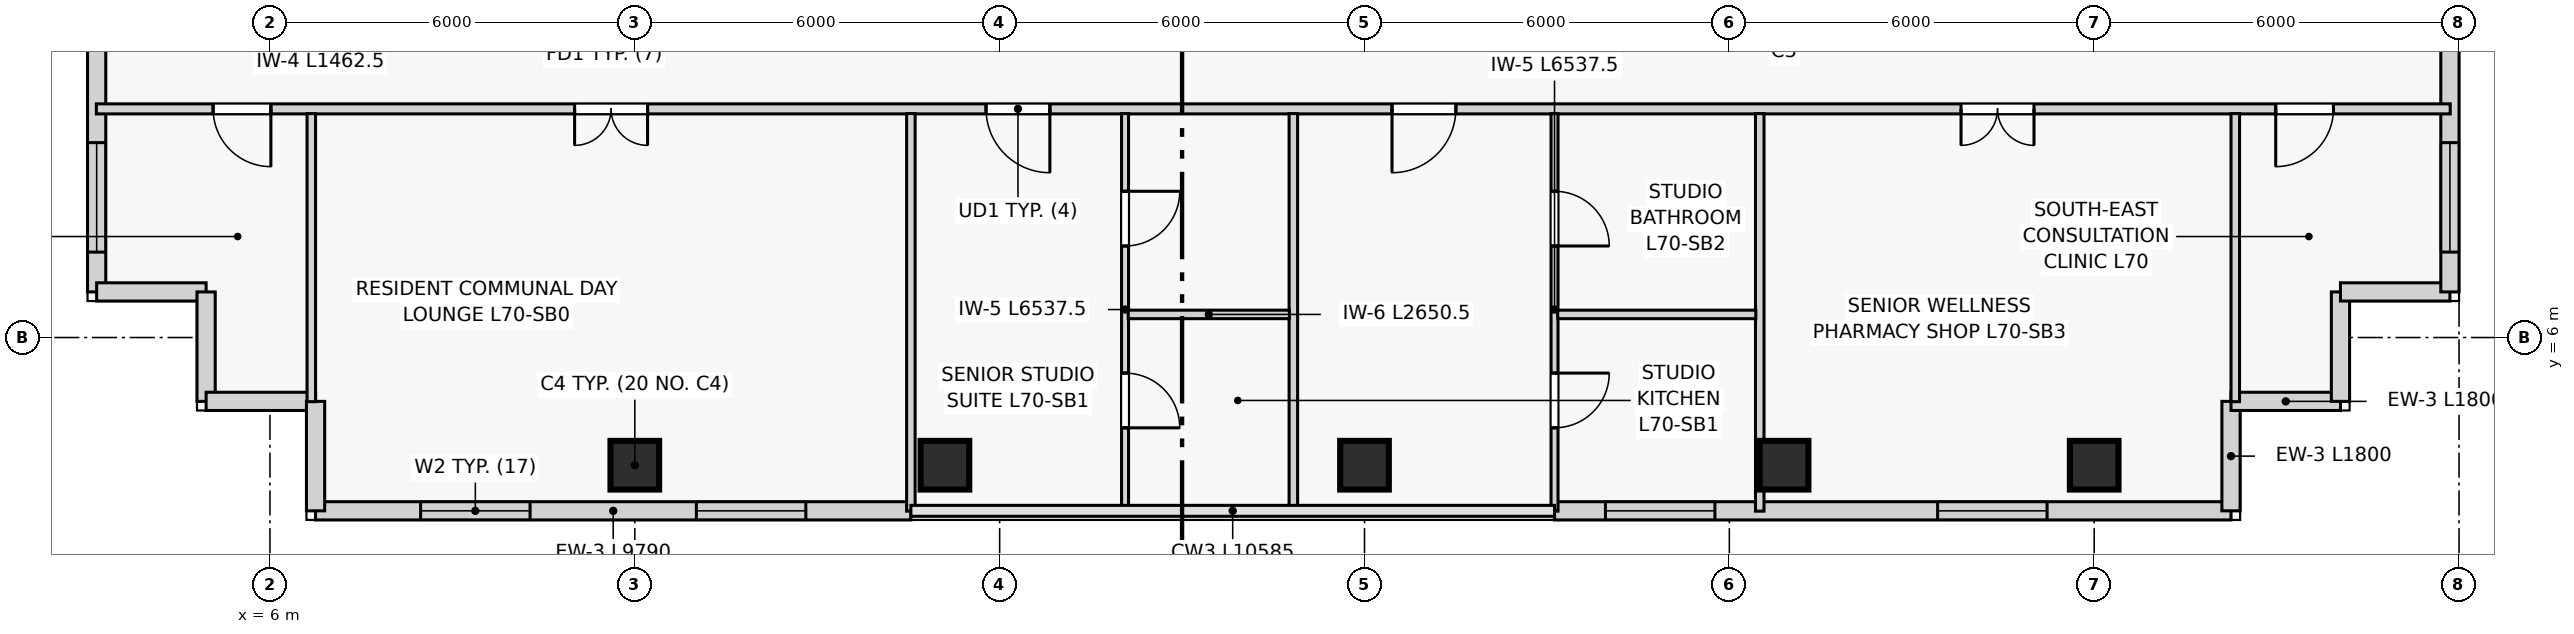
"""IFC4 building model, lengths in metres.
Left out: names, types, materials, properties, quantities, classifications, styles, units other than length and angle.
Written with IfcOpenShell. Run it as: python <this file> out.ifc"""

import sys

from ifc_helpers import new_model, si_unit, direction, frame, frame_2d, origin, origin_2d, place, context, subcontext, project, spatial, rectangle, extrude, source, transform, mapped, element, fill, save


model = new_model("IFC4")
c1 = context("Model", 3, precision=1e-05, world=origin(), true_north=direction((0.0, 1.0)))
c2 = subcontext(c1, "Body", "Model", "MODEL_VIEW")
j1 = project(units=[si_unit("LENGTHUNIT", "METRE"), si_unit("PLANEANGLEUNIT", "RADIAN")], contexts=[c1])
p1 = place(None, origin())
s1 = spatial("IfcSite", under=j1, at=p1, CompositionType="ELEMENT")
p2 = place(p1, origin())
s2 = spatial("IfcBuilding", under=s1, at=p2, CompositionType="ELEMENT")
p3 = place(p2, frame((0.0, 0.0, 267.3)))
s3 = spatial("IfcBuildingStorey", under=s2, at=p3, CompositionType="ELEMENT", Elevation=267.3)
m1 = source(origin(), c2, "Body", "SweptSolid", [
    extrude(rectangle(XDim=0.8, YDim=0.8, at=origin_2d()), origin(), (0.0, 0.0, 1.0), 3.6),
])
for number, where, z_axis, x_axis in (
    (1, (12.0, 3.9, 0.0), (0.0, 0.0, 1.0), (1.0, 0.0, 0.0)),
    (2, (17.1, 3.9, 0.0), (0.0, 0.0, 1.0), (1.0, 0.0, 0.0)),
    (3, (24.0, 3.9, 0.0), (0.0, 0.0, 1.0), (1.0, 0.0, 0.0)),
    (4, (30.9, 3.9, 0.0), (0.0, 0.0, 1.0), (1.0, 0.0, 0.0)),
    (5, (36.0, 3.9, 0.0), (0.0, 0.0, 1.0), (1.0, 0.0, 0.0)),
):
    element("IfcColumn", number, at=place(p3, frame(where, z_axis=z_axis, x_axis=x_axis)), inside=s3, PredefinedType="COLUMN", context=c2, shape_type="MappedRepresentation", body=[
        mapped(m1, transform((0.0, 0.0, 0.0), scale=1.0)),
    ])
p4 = place(p3, frame((6.75, 3.15, 0.0), z_axis=(0.0, 0.0, 1.0), x_axis=(1.0, 0.0, 0.0)))
e6 = element("IfcWall", 6, at=p4, inside=s3, PredefinedType="SOLIDWALL", context=c2, shape_type="SweptSolid", body=[
    extrude(rectangle(XDim=9.79, YDim=0.3, at=frame_2d((4.895, 0.0))), origin(), (0.0, 0.0, 1.0), 3.32),
])
p5 = place(p4, frame((1.728, 0.0, 0.8)))
e7 = element("IfcOpeningElement", 7, at=p5, cuts=e6, PredefinedType="OPENING", context=c2, shape_type="SweptSolid", body=[
    extrude(rectangle(XDim=1.8, YDim=2.1, at=frame_2d((0.9, 1.05))), frame((0.0, 0.16, 0.0), z_axis=(0.0, -1.0, 0.0), x_axis=(1.0, 0.0, 0.0)), (0.0, 0.0, 1.0), 0.32),
])
p6 = place(p4, frame((6.262, 0.0, 0.8)))
e8 = element("IfcOpeningElement", 8, at=p6, cuts=e6, PredefinedType="OPENING", context=c2, shape_type="SweptSolid", body=[
    extrude(rectangle(XDim=1.8, YDim=2.1, at=frame_2d((0.9, 1.05))), frame((0.0, 0.16, 0.0), z_axis=(0.0, -1.0, 0.0), x_axis=(1.0, 0.0, 0.0)), (0.0, 0.0, 1.0), 0.32),
])
p7 = place(p3, frame((27.125, 3.15, 0.0), z_axis=(0.0, 0.0, 1.0), x_axis=(1.0, 0.0, 0.0)))
e9 = element("IfcWall", 9, at=p7, inside=s3, PredefinedType="SOLIDWALL", context=c2, shape_type="SweptSolid", body=[
    extrude(rectangle(XDim=11.125, YDim=0.3, at=frame_2d((5.562, 0.0))), origin(), (0.0, 0.0, 1.0), 3.32),
])
p8 = place(p7, frame((0.837, 0.0, 0.8)))
e10 = element("IfcOpeningElement", 10, at=p8, cuts=e9, PredefinedType="OPENING", context=c2, shape_type="SweptSolid", body=[
    extrude(rectangle(XDim=1.8, YDim=2.1, at=frame_2d((0.9, 1.05))), frame((0.0, 0.16, 0.0), z_axis=(0.0, -1.0, 0.0), x_axis=(1.0, 0.0, 0.0)), (0.0, 0.0, 1.0), 0.32),
])
p9 = place(p7, frame((6.3, 0.0, 0.8)))
e11 = element("IfcOpeningElement", 11, at=p9, cuts=e9, PredefinedType="OPENING", context=c2, shape_type="SweptSolid", body=[
    extrude(rectangle(XDim=1.8, YDim=2.1, at=frame_2d((0.9, 1.05))), frame((0.0, 0.16, 0.0), z_axis=(0.0, -1.0, 0.0), x_axis=(1.0, 0.0, 0.0)), (0.0, 0.0, 1.0), 0.32),
])
for number, where, z_axis, x_axis in (
    (12, (38.25, 3.15, 0.0), (0.0, 0.0, 1.0), (0.0, 1.0, 0.0)),
    (13, (38.25, 4.95, 0.0), (0.0, 0.0, 1.0), (1.0, 0.0, 0.0)),
    (14, (40.05, 4.95, 0.0), (0.0, 0.0, 1.0), (0.0, 1.0, 0.0)),
    (15, (40.05, 6.75, 0.0), (0.0, 0.0, 1.0), (1.0, 0.0, 0.0)),
):
    element("IfcWall", number, at=place(p3, frame(where, z_axis=z_axis, x_axis=x_axis)), inside=s3, PredefinedType="SOLIDWALL", context=c2, shape_type="SweptSolid", body=[
        extrude(rectangle(XDim=1.8, YDim=0.3, at=frame_2d((0.9, 0.0))), origin(), (0.0, 0.0, 1.0), 3.32),
    ])
p10 = place(p3, frame((41.85, 6.75, 0.0), z_axis=(0.0, 0.0, 1.0), x_axis=(0.0, 1.0, 0.0)))
e16 = element("IfcWall", 16, at=p10, inside=s3, PredefinedType="SOLIDWALL", context=c2, shape_type="SweptSolid", body=[
    extrude(rectangle(XDim=10.71, YDim=0.3, at=frame_2d((5.355, 0.0))), origin(), (0.0, 0.0, 1.0), 3.32),
])
p11 = place(p10, frame((0.655, 0.0, 0.8)))
e17 = element("IfcOpeningElement", 17, at=p11, cuts=e16, PredefinedType="OPENING", context=c2, shape_type="SweptSolid", body=[
    extrude(rectangle(XDim=1.8, YDim=2.1, at=frame_2d((0.9, 1.05))), frame((0.0, 0.16, 0.0), z_axis=(0.0, -1.0, 0.0), x_axis=(1.0, 0.0, 0.0)), (0.0, 0.0, 1.0), 0.32),
])
p12 = place(p10, frame((5.91, 0.0, 0.8)))
e18 = element("IfcOpeningElement", 18, at=p12, cuts=e16, PredefinedType="OPENING", context=c2, shape_type="SweptSolid", body=[
    extrude(rectangle(XDim=1.8, YDim=2.1, at=frame_2d((0.9, 1.05))), frame((0.0, 0.16, 0.0), z_axis=(0.0, -1.0, 0.0), x_axis=(1.0, 0.0, 0.0)), (0.0, 0.0, 1.0), 0.32),
])
p13 = place(p3, frame((3.15, 17.46, 0.0), z_axis=(0.0, 0.0, 1.0), x_axis=(0.0, -1.0, 0.0)))
e19 = element("IfcWall", 19, at=p13, inside=s3, PredefinedType="SOLIDWALL", context=c2, shape_type="SweptSolid", body=[
    extrude(rectangle(XDim=10.71, YDim=0.3, at=frame_2d((5.355, 0.0))), origin(), (0.0, 0.0, 1.0), 3.32),
])
p14 = place(p13, frame((3.0, 0.0, 0.8)))
e20 = element("IfcOpeningElement", 20, at=p14, cuts=e19, PredefinedType="OPENING", context=c2, shape_type="SweptSolid", body=[
    extrude(rectangle(XDim=1.8, YDim=2.1, at=frame_2d((0.9, 1.05))), frame((0.0, 0.16, 0.0), z_axis=(0.0, -1.0, 0.0), x_axis=(1.0, 0.0, 0.0)), (0.0, 0.0, 1.0), 0.32),
])
p15 = place(p13, frame((8.255, 0.0, 0.8)))
e21 = element("IfcOpeningElement", 21, at=p15, cuts=e19, PredefinedType="OPENING", context=c2, shape_type="SweptSolid", body=[
    extrude(rectangle(XDim=1.8, YDim=2.1, at=frame_2d((0.9, 1.05))), frame((0.0, 0.16, 0.0), z_axis=(0.0, -1.0, 0.0), x_axis=(1.0, 0.0, 0.0)), (0.0, 0.0, 1.0), 0.32),
])
for number, where, z_axis, x_axis in (
    (22, (3.15, 6.75, 0.0), (0.0, 0.0, 1.0), (1.0, 0.0, 0.0)),
    (23, (4.95, 6.75, 0.0), (0.0, 0.0, 1.0), (0.0, -1.0, 0.0)),
    (24, (4.95, 4.95, 0.0), (0.0, 0.0, 1.0), (1.0, 0.0, 0.0)),
    (25, (6.75, 4.95, 0.0), (0.0, 0.0, 1.0), (0.0, -1.0, 0.0)),
):
    element("IfcWall", number, at=place(p3, frame(where, z_axis=z_axis, x_axis=x_axis)), inside=s3, PredefinedType="SOLIDWALL", context=c2, shape_type="SweptSolid", body=[
        extrude(rectangle(XDim=1.8, YDim=0.3, at=frame_2d((0.9, 0.0))), origin(), (0.0, 0.0, 1.0), 3.32),
    ])
p16 = place(p3, frame((3.145, 9.76, 0.0), z_axis=(0.0, 0.0, 1.0), x_axis=(1.0, 0.0, 0.0)))
e26 = element("IfcWall", 26, at=p16, inside=s3, PredefinedType="PARTITIONING", context=c2, shape_type="SweptSolid", body=[
    extrude(rectangle(XDim=38.71, YDim=0.165, at=frame_2d((19.355, 0.0))), origin(), (0.0, 0.0, 1.0), 3.32),
])
p17 = place(p16, frame((7.865, 0.0, 0.0)))
e27 = element("IfcOpeningElement", 27, at=p17, cuts=e26, PredefinedType="OPENING", context=c2, shape_type="SweptSolid", body=[
    extrude(rectangle(XDim=1.2, YDim=2.2, at=frame_2d((0.6, 1.1))), frame((0.0, 0.093, 0.0), z_axis=(0.0, -1.0, 0.0), x_axis=(1.0, 0.0, 0.0)), (0.0, 0.0, 1.0), 0.185),
])
p18 = place(p16, frame((14.631, 0.0, 0.0)))
e28 = element("IfcOpeningElement", 28, at=p18, cuts=e26, PredefinedType="OPENING", context=c2, shape_type="SweptSolid", body=[
    extrude(rectangle(XDim=1.05, YDim=2.15, at=frame_2d((0.525, 1.075))), frame((0.0, 0.093, 0.0), z_axis=(0.0, -1.0, 0.0), x_axis=(1.0, 0.0, 0.0)), (0.0, 0.0, 1.0), 0.185),
])
p19 = place(p16, frame((21.308, 0.0, 0.0)))
e29 = element("IfcOpeningElement", 29, at=p19, cuts=e26, PredefinedType="OPENING", context=c2, shape_type="SweptSolid", body=[
    extrude(rectangle(XDim=1.05, YDim=2.15, at=frame_2d((0.525, 1.075))), frame((0.0, 0.093, 0.0), z_axis=(0.0, -1.0, 0.0), x_axis=(1.0, 0.0, 0.0)), (0.0, 0.0, 1.0), 0.185),
])
p20 = place(p16, frame((30.665, 0.0, 0.0)))
e30 = element("IfcOpeningElement", 30, at=p20, cuts=e26, PredefinedType="OPENING", context=c2, shape_type="SweptSolid", body=[
    extrude(rectangle(XDim=1.2, YDim=2.2, at=frame_2d((0.6, 1.1))), frame((0.0, 0.093, 0.0), z_axis=(0.0, -1.0, 0.0), x_axis=(1.0, 0.0, 0.0)), (0.0, 0.0, 1.0), 0.185),
])
p21 = place(p16, frame((1.92, 0.0, 0.0)))
e31 = element("IfcOpeningElement", 31, at=p21, cuts=e26, PredefinedType="OPENING", context=c2, shape_type="SweptSolid", body=[
    extrude(rectangle(XDim=0.95, YDim=2.1, at=frame_2d((0.475, 1.05))), frame((0.0, 0.093, 0.0), z_axis=(0.0, -1.0, 0.0), x_axis=(1.0, 0.0, 0.0)), (0.0, 0.0, 1.0), 0.185),
])
p22 = place(p16, frame((35.84, 0.0, 0.0)))
e32 = element("IfcOpeningElement", 32, at=p22, cuts=e26, PredefinedType="OPENING", context=c2, shape_type="SweptSolid", body=[
    extrude(rectangle(XDim=0.95, YDim=2.1, at=frame_2d((0.475, 1.05))), frame((0.0, 0.093, 0.0), z_axis=(0.0, -1.0, 0.0), x_axis=(1.0, 0.0, 0.0)), (0.0, 0.0, 1.0), 0.185),
])
p23 = place(p3, frame((6.68, 4.945, 0.0), z_axis=(0.0, 0.0, 1.0), x_axis=(0.0, 1.0, 0.0)))
e33 = element("IfcWall", 33, at=p23, inside=s3, PredefinedType="PARTITIONING", context=c2, shape_type="SweptSolid", body=[
    extrude(rectangle(XDim=4.738, YDim=0.14, at=frame_2d((2.369, 0.0))), origin(), (0.0, 0.0, 1.0), 3.32),
])
for number, where, z_axis, x_axis in (
    (34, (16.54, 3.145, 0.0), (0.0, 0.0, 1.0), (0.0, 1.0, 0.0)),
    (35, (22.83, 3.145, 0.0), (0.0, 0.0, 1.0), (0.0, 1.0, 0.0)),
):
    element("IfcWall", number, at=place(p3, frame(where, z_axis=z_axis, x_axis=x_axis)), inside=s3, PredefinedType="PARTITIONING", context=c2, shape_type="SweptSolid", body=[
        extrude(rectangle(XDim=6.538, YDim=0.14, at=frame_2d((3.269, 0.0))), origin(), (0.0, 0.0, 1.0), 3.32),
    ])
p24 = place(p3, frame((30.5, 3.145, 0.0), z_axis=(0.0, 0.0, 1.0), x_axis=(0.0, 1.0, 0.0)))
e36 = element("IfcWall", 36, at=p24, inside=s3, PredefinedType="PARTITIONING", context=c2, shape_type="SweptSolid", body=[
    extrude(rectangle(XDim=6.538, YDim=0.14, at=frame_2d((3.269, 0.0))), origin(), (0.0, 0.0, 1.0), 2.47),
])
p25 = place(p3, frame((38.32, 4.945, 0.0), z_axis=(0.0, 0.0, 1.0), x_axis=(0.0, 1.0, 0.0)))
e37 = element("IfcWall", 37, at=p25, inside=s3, PredefinedType="PARTITIONING", context=c2, shape_type="SweptSolid", body=[
    extrude(rectangle(XDim=4.738, YDim=0.14, at=frame_2d((2.369, 0.0))), origin(), (0.0, 0.0, 1.0), 3.32),
])
p26 = place(p3, frame((20.062, 3.145, 0.0), z_axis=(0.0, 0.0, 1.0), x_axis=(0.0, 1.0, 0.0)))
e38 = element("IfcWall", 38, at=p26, inside=s3, PredefinedType="PARTITIONING", context=c2, shape_type="SweptSolid", body=[
    extrude(rectangle(XDim=6.538, YDim=0.115, at=frame_2d((3.269, 0.0))), origin(), (0.0, 0.0, 1.0), 3.32),
])
p27 = place(p26, frame((1.37, 0.0, 0.0)))
e39 = element("IfcOpeningElement", 39, at=p27, cuts=e38, PredefinedType="OPENING", context=c2, shape_type="SweptSolid", body=[
    extrude(rectangle(XDim=0.9, YDim=2.1, at=frame_2d((0.45, 1.05))), frame((0.0, 0.067, 0.0), z_axis=(0.0, -1.0, 0.0), x_axis=(1.0, 0.0, 0.0)), (0.0, 0.0, 1.0), 0.135),
])
p28 = place(p26, frame((4.36, 0.0, 0.0)))
e40 = element("IfcOpeningElement", 40, at=p28, cuts=e38, PredefinedType="OPENING", context=c2, shape_type="SweptSolid", body=[
    extrude(rectangle(XDim=0.9, YDim=2.1, at=frame_2d((0.45, 1.05))), frame((0.0, 0.067, 0.0), z_axis=(0.0, -1.0, 0.0), x_axis=(1.0, 0.0, 0.0)), (0.0, 0.0, 1.0), 0.135),
])
p29 = place(p3, frame((20.115, 6.38, 0.0), z_axis=(0.0, 0.0, 1.0), x_axis=(1.0, 0.0, 0.0)))
e41 = element("IfcWall", 41, at=p29, inside=s3, PredefinedType="PLUMBINGWALL", context=c2, shape_type="SweptSolid", body=[
    extrude(rectangle(XDim=2.65, YDim=0.14, at=frame_2d((1.325, 0.0))), origin(), (0.0, 0.0, 1.0), 3.32),
])
p30 = place(p3, frame((27.125, 3.145, 0.0), z_axis=(0.0, 0.0, 1.0), x_axis=(0.0, 1.0, 0.0)))
e42 = element("IfcWall", 42, at=p30, inside=s3, PredefinedType="PARTITIONING", context=c2, shape_type="SweptSolid", body=[
    extrude(rectangle(XDim=6.538, YDim=0.115, at=frame_2d((3.269, 0.0))), origin(), (0.0, 0.0, 1.0), 3.32),
])
p31 = place(p30, frame((1.37, 0.0, 0.0)))
e43 = element("IfcOpeningElement", 43, at=p31, cuts=e42, PredefinedType="OPENING", context=c2, shape_type="SweptSolid", body=[
    extrude(rectangle(XDim=0.9, YDim=2.1, at=frame_2d((0.45, 1.05))), frame((0.0, 0.067, 0.0), z_axis=(0.0, -1.0, 0.0), x_axis=(1.0, 0.0, 0.0)), (0.0, 0.0, 1.0), 0.135),
])
p32 = place(p30, frame((4.36, 0.0, 0.0)))
e44 = element("IfcOpeningElement", 44, at=p32, cuts=e42, PredefinedType="OPENING", context=c2, shape_type="SweptSolid", body=[
    extrude(rectangle(XDim=0.9, YDim=2.1, at=frame_2d((0.45, 1.05))), frame((0.0, 0.067, 0.0), z_axis=(0.0, -1.0, 0.0), x_axis=(1.0, 0.0, 0.0)), (0.0, 0.0, 1.0), 0.135),
])
p33 = place(p3, frame((27.177, 6.38, 0.0), z_axis=(0.0, 0.0, 1.0), x_axis=(1.0, 0.0, 0.0)))
e45 = element("IfcWall", 45, at=p33, inside=s3, PredefinedType="PLUMBINGWALL", context=c2, shape_type="SweptSolid", body=[
    extrude(rectangle(XDim=3.258, YDim=0.14, at=frame_2d((1.629, 0.0))), origin(), (0.0, 0.0, 1.0), 3.32),
])
m2 = source(origin(), c2, "Body", "SweptSolid", [
    extrude(rectangle(XDim=1.8, YDim=2.1, at=frame_2d((0.9, 1.05))), frame((0.0, 0.03, 0.0), z_axis=(0.0, -1.0, 0.0), x_axis=(1.0, 0.0, 0.0)), (0.0, 0.0, 1.0), 0.06),
])
p34 = place(p5, origin())
e46 = element("IfcWindow", 46, at=p34, inside=s3, PartitioningType="SINGLE_PANEL", PredefinedType="WINDOW", context=c2, shape_type="MappedRepresentation", body=[
    mapped(m2, transform((0.0, 0.0, 0.0), scale=1.0)),
])
fill(e7, e46)
p35 = place(p6, origin())
e47 = element("IfcWindow", 47, at=p35, inside=s3, PartitioningType="SINGLE_PANEL", PredefinedType="WINDOW", context=c2, shape_type="MappedRepresentation", body=[
    mapped(m2, transform((0.0, 0.0, 0.0), scale=1.0)),
])
fill(e8, e47)
p36 = place(p8, origin())
e48 = element("IfcWindow", 48, at=p36, inside=s3, PartitioningType="SINGLE_PANEL", PredefinedType="WINDOW", context=c2, shape_type="MappedRepresentation", body=[
    mapped(m2, transform((0.0, 0.0, 0.0), scale=1.0)),
])
fill(e10, e48)
p37 = place(p9, origin())
e49 = element("IfcWindow", 49, at=p37, inside=s3, PartitioningType="SINGLE_PANEL", PredefinedType="WINDOW", context=c2, shape_type="MappedRepresentation", body=[
    mapped(m2, transform((0.0, 0.0, 0.0), scale=1.0)),
])
fill(e11, e49)
p38 = place(p11, origin())
e50 = element("IfcWindow", 50, at=p38, inside=s3, PartitioningType="SINGLE_PANEL", PredefinedType="WINDOW", context=c2, shape_type="MappedRepresentation", body=[
    mapped(m2, transform((0.0, 0.0, 0.0), scale=1.0)),
])
fill(e17, e50)
p39 = place(p15, origin())
e51 = element("IfcWindow", 51, at=p39, inside=s3, PartitioningType="SINGLE_PANEL", PredefinedType="WINDOW", context=c2, shape_type="MappedRepresentation", body=[
    mapped(m2, transform((0.0, 0.0, 0.0), scale=1.0)),
])
fill(e21, e51)
m3 = source(origin(), c2, "Body", "SweptSolid", [
    extrude(rectangle(XDim=1.2, YDim=2.2, at=frame_2d((0.6, 1.1))), frame((0.0, 0.025, 0.0), z_axis=(0.0, -1.0, 0.0), x_axis=(1.0, 0.0, 0.0)), (0.0, 0.0, 1.0), 0.05),
])
p40 = place(p17, frame((1.2, 0.0, 0.0), z_axis=(0.0, 0.0, 1.0), x_axis=(-1.0, 0.0, 0.0)))
e52 = element("IfcDoor", 52, at=p40, inside=s3, OperationType="DOUBLE_DOOR_SINGLE_SWING", PredefinedType="DOOR", context=c2, shape_type="MappedRepresentation", body=[
    mapped(m3, transform((0.0, 0.0, 0.0), scale=1.0)),
])
fill(e27, e52)
m4 = source(origin(), c2, "Body", "SweptSolid", [
    extrude(rectangle(XDim=1.05, YDim=2.15, at=frame_2d((0.525, 1.075))), frame((0.0, 0.025, 0.0), z_axis=(0.0, -1.0, 0.0), x_axis=(1.0, 0.0, 0.0)), (0.0, 0.0, 1.0), 0.05),
])
p41 = place(p18, frame((1.05, 0.0, 0.0), z_axis=(0.0, 0.0, 1.0), x_axis=(-1.0, 0.0, 0.0)))
e53 = element("IfcDoor", 53, at=p41, inside=s3, OperationType="SINGLE_SWING_LEFT", PredefinedType="DOOR", context=c2, shape_type="MappedRepresentation", body=[
    mapped(m4, transform((0.0, 0.0, 0.0), scale=1.0)),
])
fill(e28, e53)
m5 = source(origin(), c2, "Body", "SweptSolid", [
    extrude(rectangle(XDim=0.9, YDim=2.1, at=frame_2d((0.45, 1.05))), frame((0.0, 0.025, 0.0), z_axis=(0.0, -1.0, 0.0), x_axis=(1.0, 0.0, 0.0)), (0.0, 0.0, 1.0), 0.05),
])
p42 = place(p27, frame((0.9, 0.0, 0.0), z_axis=(0.0, 0.0, 1.0), x_axis=(-1.0, 0.0, 0.0)))
e54 = element("IfcDoor", 54, at=p42, inside=s3, OperationType="SINGLE_SWING_RIGHT", PredefinedType="DOOR", context=c2, shape_type="MappedRepresentation", body=[
    mapped(m5, transform((0.0, 0.0, 0.0), scale=1.0)),
])
fill(e39, e54)
p43 = place(p28, frame((0.9, 0.0, 0.0), z_axis=(0.0, 0.0, 1.0), x_axis=(-1.0, 0.0, 0.0)))
e55 = element("IfcDoor", 55, at=p43, inside=s3, OperationType="SINGLE_SWING_LEFT", PredefinedType="DOOR", context=c2, shape_type="MappedRepresentation", body=[
    mapped(m5, transform((0.0, 0.0, 0.0), scale=1.0)),
])
fill(e40, e55)
p44 = place(p19, frame((1.05, 0.0, 0.0), z_axis=(0.0, 0.0, 1.0), x_axis=(-1.0, 0.0, 0.0)))
e56 = element("IfcDoor", 56, at=p44, inside=s3, OperationType="SINGLE_SWING_RIGHT", PredefinedType="DOOR", context=c2, shape_type="MappedRepresentation", body=[
    mapped(m4, transform((0.0, 0.0, 0.0), scale=1.0)),
])
fill(e29, e56)
p45 = place(p31, frame((0.9, 0.0, 0.0), z_axis=(0.0, 0.0, 1.0), x_axis=(-1.0, 0.0, 0.0)))
e57 = element("IfcDoor", 57, at=p45, inside=s3, OperationType="SINGLE_SWING_LEFT", PredefinedType="DOOR", context=c2, shape_type="MappedRepresentation", body=[
    mapped(m5, transform((0.0, 0.0, 0.0), scale=1.0)),
])
fill(e43, e57)
p46 = place(p32, frame((0.9, 0.0, 0.0), z_axis=(0.0, 0.0, 1.0), x_axis=(-1.0, 0.0, 0.0)))
e58 = element("IfcDoor", 58, at=p46, inside=s3, OperationType="SINGLE_SWING_RIGHT", PredefinedType="DOOR", context=c2, shape_type="MappedRepresentation", body=[
    mapped(m5, transform((0.0, 0.0, 0.0), scale=1.0)),
])
fill(e44, e58)
p47 = place(p20, frame((1.2, 0.0, 0.0), z_axis=(0.0, 0.0, 1.0), x_axis=(-1.0, 0.0, 0.0)))
e59 = element("IfcDoor", 59, at=p47, inside=s3, OperationType="DOUBLE_DOOR_SINGLE_SWING", PredefinedType="DOOR", context=c2, shape_type="MappedRepresentation", body=[
    mapped(m3, transform((0.0, 0.0, 0.0), scale=1.0)),
])
fill(e30, e59)
m6 = source(origin(), c2, "Body", "SweptSolid", [
    extrude(rectangle(XDim=0.95, YDim=2.1, at=frame_2d((0.475, 1.05))), frame((0.0, 0.025, 0.0), z_axis=(0.0, -1.0, 0.0), x_axis=(1.0, 0.0, 0.0)), (0.0, 0.0, 1.0), 0.05),
])
p48 = place(p21, frame((0.95, 0.0, 0.0), z_axis=(0.0, 0.0, 1.0), x_axis=(-1.0, 0.0, 0.0)))
e60 = element("IfcDoor", 60, at=p48, inside=s3, OperationType="SINGLE_SWING_LEFT", PredefinedType="DOOR", context=c2, shape_type="MappedRepresentation", body=[
    mapped(m6, transform((0.0, 0.0, 0.0), scale=1.0)),
])
fill(e31, e60)
p49 = place(p22, frame((0.95, 0.0, 0.0), z_axis=(0.0, 0.0, 1.0), x_axis=(-1.0, 0.0, 0.0)))
e61 = element("IfcDoor", 61, at=p49, inside=s3, OperationType="SINGLE_SWING_RIGHT", PredefinedType="DOOR", context=c2, shape_type="MappedRepresentation", body=[
    mapped(m6, transform((0.0, 0.0, 0.0), scale=1.0)),
])
fill(e32, e61)
save(model, sys.argv[1])
